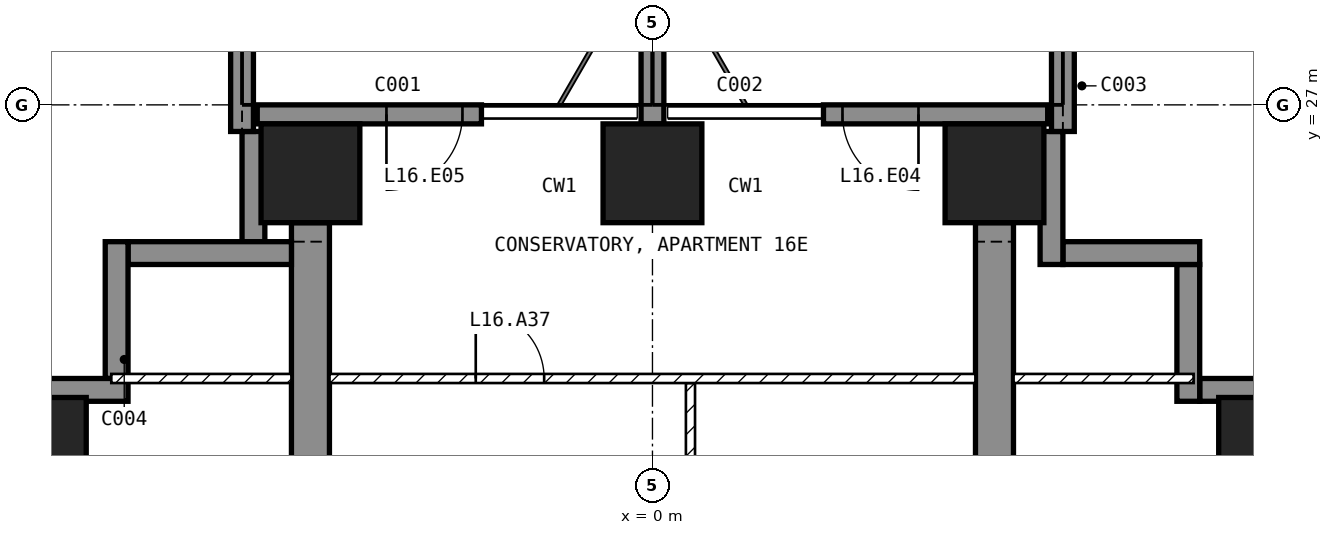
"""IFC4 building model, lengths in metres.
Left out: names, types, materials, properties, quantities, classifications, styles, units other than length and angle.
Written with IfcOpenShell. Run it as: python <this file> out.ifc"""

import sys

from ifc_helpers import new_model, si_unit, direction, frame, frame_2d, origin, origin_2d, place, context, subcontext, project, spatial, polyline, rectangle, outline, extrude, element, fill, save


model = new_model("IFC4")
c1 = context("Model", 3, precision=1e-05, world=origin(), true_north=direction((0.0, 1.0)))
c2 = subcontext(c1, "Body", "Model", "MODEL_VIEW")
j1 = project(units=[si_unit("LENGTHUNIT", "METRE"), si_unit("PLANEANGLEUNIT", "RADIAN")], contexts=[c1])
p1 = place(None, origin())
s1 = spatial("IfcSite", under=j1, at=p1, CompositionType="ELEMENT")
p2 = place(p1, origin())
s2 = spatial("IfcBuilding", under=s1, at=p2, CompositionType="ELEMENT")
p3 = place(p2, frame((0.0, 0.0, 75.0)))
s3 = spatial("IfcBuildingStorey", under=s2, at=p3, CompositionType="ELEMENT", Elevation=75.0)
for number, where, z_axis, x_axis in (
    (1, (-8.1, 22.5, -0.25), (0.0, 0.0, 1.0), (1.0, 0.0, 0.0)),
    (2, (-4.5, 26.1, -0.25), (0.0, 0.0, 1.0), (1.0, 0.0, 0.0)),
    (3, (0.0, 26.1, -0.25), (0.0, 0.0, 1.0), (1.0, 0.0, 0.0)),
    (4, (4.5, 26.1, -0.25), (0.0, 0.0, 1.0), (1.0, 0.0, 0.0)),
    (5, (8.1, 22.5, -0.25), (0.0, 0.0, 1.0), (1.0, 0.0, 0.0)),
):
    element("IfcColumn", number, at=place(p3, frame(where, z_axis=z_axis, x_axis=x_axis)), inside=s3, PredefinedType="COLUMN", context=c2, shape_type="SweptSolid", body=[
        extrude(rectangle(XDim=1.3, YDim=1.3, at=origin_2d()), origin(), (0.0, 0.0, 1.0), 3.5),
    ])
for number, where, z_axis, x_axis in (
    (6, (-4.75, 9.0, -0.25), (1.0, 0.0, 0.0), (0.0, 1.0, 0.0)),
    (7, (4.25, 9.0, -0.25), (1.0, 0.0, 0.0), (0.0, 1.0, 0.0)),
):
    element("IfcWall", number, at=place(p3, frame(where, z_axis=z_axis, x_axis=x_axis)), inside=s3, PredefinedType="SHEAR", context=c2, shape_type="SweptSolid", body=[
        extrude(outline(polyline([(0.0, 0.0), (2.1, 0.0), (2.1, 2.65), (4.5, 2.65), (4.5, 0.0), (9.9, 0.0), (9.9, 2.65), (12.3, 2.65), (12.3, 0.0), (16.45, 0.0), (16.45, 3.5), (0.0, 3.5), (0.0, 0.0)])), origin(), (0.0, 0.0, 1.0), 0.5),
    ])
p4 = place(p3, frame((5.2, 26.875, 0.0), z_axis=(0.0, 0.0, 1.0), x_axis=(-1.0, 0.0, 0.0)))
e8 = element("IfcWall", 8, at=p4, inside=s3, PredefinedType="SOLIDWALL", context=c2, shape_type="SweptSolid", body=[
    extrude(rectangle(XDim=2.95, YDim=0.25, at=frame_2d((1.475, 0.0))), origin(), (0.0, 0.0, 1.0), 3.25),
])
p5 = place(p4, frame((1.7, 0.0, 0.0)))
e9 = element("IfcOpeningElement", 9, at=p5, cuts=e8, PredefinedType="OPENING", context=c2, shape_type="SweptSolid", body=[
    extrude(rectangle(XDim=1.0, YDim=2.4, at=frame_2d((0.5, 1.2))), frame((0.0, 0.135, 0.0), z_axis=(0.0, -1.0, 0.0), x_axis=(1.0, 0.0, 0.0)), (0.0, 0.0, 1.0), 0.27),
])
p6 = place(p3, frame((-2.25, 26.875, 0.0), z_axis=(0.0, 0.0, 1.0), x_axis=(-1.0, 0.0, 0.0)))
e10 = element("IfcWall", 10, at=p6, inside=s3, PredefinedType="SOLIDWALL", context=c2, shape_type="SweptSolid", body=[
    extrude(rectangle(XDim=2.95, YDim=0.25, at=frame_2d((1.475, 0.0))), origin(), (0.0, 0.0, 1.0), 3.25),
])
p7 = place(p6, frame((0.25, 0.0, 0.0)))
e11 = element("IfcOpeningElement", 11, at=p7, cuts=e10, PredefinedType="OPENING", context=c2, shape_type="SweptSolid", body=[
    extrude(rectangle(XDim=1.0, YDim=2.4, at=frame_2d((0.5, 1.2))), frame((0.0, 0.135, 0.0), z_axis=(0.0, -1.0, 0.0), x_axis=(1.0, 0.0, 0.0)), (0.0, 0.0, 1.0), 0.27),
])
p8 = place(p3, frame((8.65, 23.25, 0.0), z_axis=(0.0, 0.0, 1.0), x_axis=(-1.0, 0.0, 0.0)))
e12 = element("IfcWall", 12, at=p8, inside=s3, PredefinedType="SOLIDWALL", context=c2, shape_type="SweptSolid", body=[
    extrude(rectangle(XDim=1.45, YDim=0.3, at=frame_2d((0.725, 0.0))), origin(), (0.0, 0.0, 1.0), 3.25),
])
p9 = place(p3, frame((7.05, 23.1, 0.0), z_axis=(0.0, 0.0, 1.0), x_axis=(0.0, 1.0, 0.0)))
e13 = element("IfcWall", 13, at=p9, inside=s3, PredefinedType="SOLIDWALL", context=c2, shape_type="SweptSolid", body=[
    extrude(rectangle(XDim=1.8, YDim=0.3, at=frame_2d((0.9, 0.0))), origin(), (0.0, 0.0, 1.0), 3.25),
])
p10 = place(p3, frame((7.2, 25.05, 0.0), z_axis=(0.0, 0.0, 1.0), x_axis=(-1.0, 0.0, 0.0)))
e14 = element("IfcWall", 14, at=p10, inside=s3, PredefinedType="SOLIDWALL", context=c2, shape_type="SweptSolid", body=[
    extrude(rectangle(XDim=1.8, YDim=0.3, at=frame_2d((0.9, 0.0))), origin(), (0.0, 0.0, 1.0), 3.25),
])
p11 = place(p3, frame((5.25, 24.9, 0.0), z_axis=(0.0, 0.0, 1.0), x_axis=(0.0, 1.0, 0.0)))
e15 = element("IfcWall", 15, at=p11, inside=s3, PredefinedType="SOLIDWALL", context=c2, shape_type="SweptSolid", body=[
    extrude(rectangle(XDim=1.75, YDim=0.3, at=frame_2d((0.875, 0.0))), origin(), (0.0, 0.0, 1.0), 3.25),
])
p12 = place(p3, frame((-5.25, 26.65, 0.0), z_axis=(0.0, 0.0, 1.0), x_axis=(0.0, -1.0, 0.0)))
e16 = element("IfcWall", 16, at=p12, inside=s3, PredefinedType="SOLIDWALL", context=c2, shape_type="SweptSolid", body=[
    extrude(rectangle(XDim=1.45, YDim=0.3, at=frame_2d((0.725, 0.0))), origin(), (0.0, 0.0, 1.0), 3.25),
])
p13 = place(p3, frame((-4.75, 25.05, 0.0), z_axis=(0.0, 0.0, 1.0), x_axis=(-1.0, 0.0, 0.0)))
e17 = element("IfcWall", 17, at=p13, inside=s3, PredefinedType="SOLIDWALL", context=c2, shape_type="SweptSolid", body=[
    extrude(rectangle(XDim=2.15, YDim=0.3, at=frame_2d((1.075, 0.0))), origin(), (0.0, 0.0, 1.0), 3.25),
])
p14 = place(p3, frame((-7.05, 25.2, 0.0), z_axis=(0.0, 0.0, 1.0), x_axis=(0.0, -1.0, 0.0)))
e18 = element("IfcWall", 18, at=p14, inside=s3, PredefinedType="SOLIDWALL", context=c2, shape_type="SweptSolid", body=[
    extrude(rectangle(XDim=1.8, YDim=0.3, at=frame_2d((0.9, 0.0))), origin(), (0.0, 0.0, 1.0), 3.25),
])
p15 = place(p3, frame((-6.9, 23.25, 0.0), z_axis=(0.0, 0.0, 1.0), x_axis=(-1.0, 0.0, 0.0)))
e19 = element("IfcWall", 19, at=p15, inside=s3, PredefinedType="SOLIDWALL", context=c2, shape_type="SweptSolid", body=[
    extrude(rectangle(XDim=1.75, YDim=0.3, at=frame_2d((0.875, 0.0))), origin(), (0.0, 0.0, 1.0), 3.25),
])
p16 = place(p3, frame((-5.4, 26.65, 0.0), z_axis=(0.0, 0.0, 1.0), x_axis=(0.0, 1.0, 0.0)))
e20 = element("IfcWall", 20, at=p16, inside=s3, PredefinedType="SOLIDWALL", context=c2, shape_type="SweptSolid", body=[
    extrude(rectangle(XDim=3.05, YDim=0.3, at=frame_2d((1.525, 0.0))), origin(), (0.0, 0.0, 1.0), 3.25),
])
p17 = place(p3, frame((0.0, 26.75, 0.0), z_axis=(0.0, 0.0, 1.0), x_axis=(0.0, 1.0, 0.0)))
e21 = element("IfcWall", 21, at=p17, inside=s3, PredefinedType="SOLIDWALL", context=c2, shape_type="SweptSolid", body=[
    extrude(rectangle(XDim=2.95, YDim=0.3, at=frame_2d((1.475, 0.0))), origin(), (0.0, 0.0, 1.0), 3.25),
])
p18 = place(p3, frame((5.4, 26.65, 0.0), z_axis=(0.0, 0.0, 1.0), x_axis=(0.0, 1.0, 0.0)))
e22 = element("IfcWall", 22, at=p18, inside=s3, PredefinedType="SOLIDWALL", context=c2, shape_type="SweptSolid", body=[
    extrude(rectangle(XDim=3.05, YDim=0.3, at=frame_2d((1.525, 0.0))), origin(), (0.0, 0.0, 1.0), 3.25),
])
p19 = place(p3, frame((0.5, 23.34, 0.0), z_axis=(0.0, 0.0, 1.0), x_axis=(0.0, -1.0, 0.0)))
e23 = element("IfcWall", 23, at=p19, inside=s3, PredefinedType="PARTITIONING", context=c2, shape_type="SweptSolid", body=[
    extrude(rectangle(XDim=4.38, YDim=0.12, at=frame_2d((2.19, 0.0))), origin(), (0.0, 0.0, 1.0), 3.25),
])
p20 = place(p19, frame((1.74, 0.0, 0.0)))
e24 = element("IfcOpeningElement", 24, at=p20, cuts=e23, PredefinedType="OPENING", context=c2, shape_type="SweptSolid", body=[
    extrude(rectangle(XDim=0.9, YDim=2.1, at=frame_2d((0.45, 1.05))), frame((0.0, 0.07, 0.0), z_axis=(0.0, -1.0, 0.0), x_axis=(1.0, 0.0, 0.0)), (0.0, 0.0, 1.0), 0.14),
])
p21 = place(p3, frame((-4.25, 23.4, 0.0), z_axis=(0.0, 0.0, 1.0), x_axis=(1.0, 0.0, 0.0)))
e25 = element("IfcWall", 25, at=p21, inside=s3, PredefinedType="PARTITIONING", context=c2, shape_type="SweptSolid", body=[
    extrude(rectangle(XDim=8.5, YDim=0.12, at=frame_2d((4.25, 0.0))), origin(), (0.0, 0.0, 1.0), 3.25),
])
p22 = place(p21, frame((1.925, 0.0, 0.0)))
e26 = element("IfcOpeningElement", 26, at=p22, cuts=e25, PredefinedType="OPENING", context=c2, shape_type="SweptSolid", body=[
    extrude(rectangle(XDim=0.9, YDim=2.1, at=frame_2d((0.45, 1.05))), frame((0.0, 0.07, 0.0), z_axis=(0.0, -1.0, 0.0), x_axis=(1.0, 0.0, 0.0)), (0.0, 0.0, 1.0), 0.14),
])
for number, where, z_axis, x_axis in (
    (27, (4.75, 23.4, 0.0), (0.0, 0.0, 1.0), (1.0, 0.0, 0.0)),
    (28, (-7.12, 23.4, 0.0), (0.0, 0.0, 1.0), (1.0, 0.0, 0.0)),
):
    element("IfcWall", number, at=place(p3, frame(where, z_axis=z_axis, x_axis=x_axis)), inside=s3, PredefinedType="PARTITIONING", context=c2, shape_type="SweptSolid", body=[
        extrude(rectangle(XDim=2.37, YDim=0.12, at=frame_2d((1.185, 0.0))), origin(), (0.0, 0.0, 1.0), 3.25),
    ])
p23 = place(p5, origin())
e29 = element("IfcDoor", 29, at=p23, inside=s3, OperationType="SINGLE_SWING_LEFT", PredefinedType="DOOR", context=c2, shape_type="SweptSolid", body=[
    extrude(rectangle(XDim=1.0, YDim=2.4, at=frame_2d((0.5, 1.2))), frame((0.0, 0.025, 0.0), z_axis=(0.0, -1.0, 0.0), x_axis=(1.0, 0.0, 0.0)), (0.0, 0.0, 1.0), 0.05),
])
fill(e9, e29)
p24 = place(p7, origin())
e30 = element("IfcDoor", 30, at=p24, inside=s3, OperationType="SINGLE_SWING_RIGHT", PredefinedType="DOOR", context=c2, shape_type="SweptSolid", body=[
    extrude(rectangle(XDim=1.0, YDim=2.4, at=frame_2d((0.5, 1.2))), frame((0.0, 0.025, 0.0), z_axis=(0.0, -1.0, 0.0), x_axis=(1.0, 0.0, 0.0)), (0.0, 0.0, 1.0), 0.05),
])
fill(e11, e30)
p25 = place(p22, origin())
e31 = element("IfcDoor", 31, at=p25, inside=s3, OperationType="SINGLE_SWING_LEFT", PredefinedType="DOOR", context=c2, shape_type="SweptSolid", body=[
    extrude(rectangle(XDim=0.9, YDim=2.1, at=frame_2d((0.45, 1.05))), frame((0.0, 0.025, 0.0), z_axis=(0.0, -1.0, 0.0), x_axis=(1.0, 0.0, 0.0)), (0.0, 0.0, 1.0), 0.05),
])
fill(e26, e31)
save(model, sys.argv[1])
